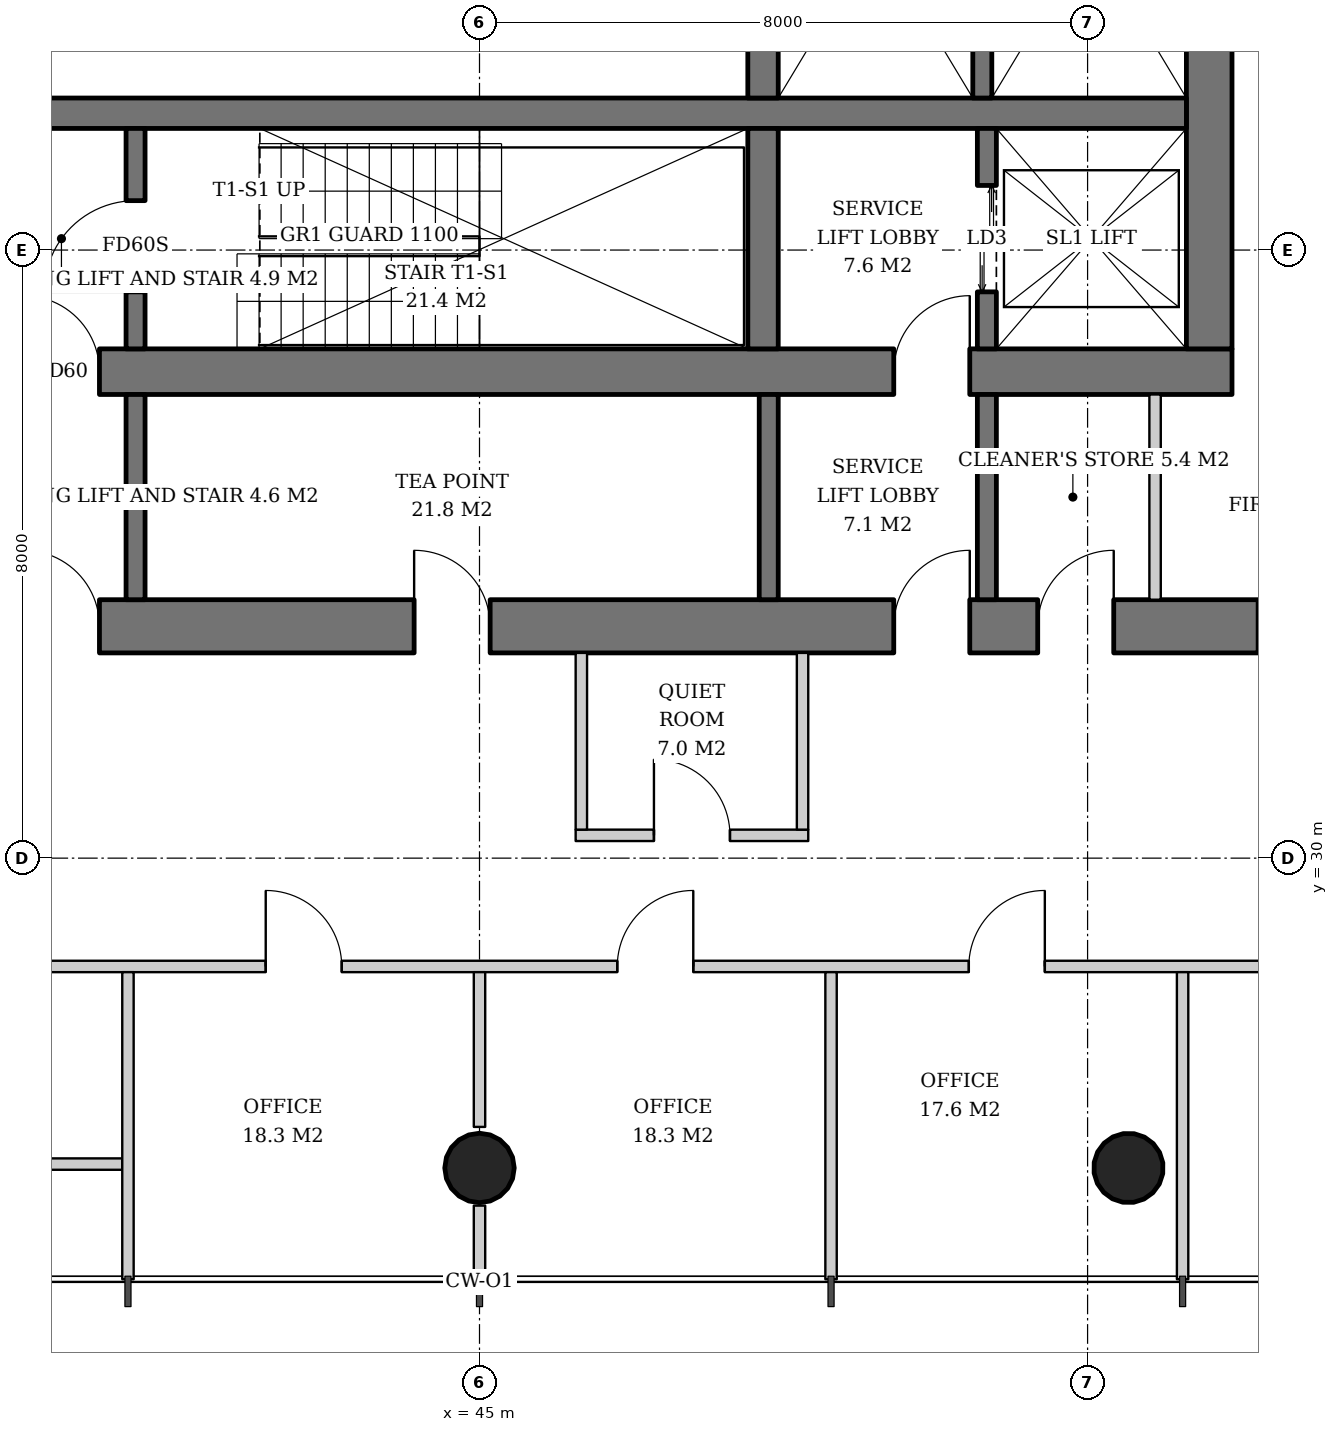
"""IFC4 building model, lengths in metres.
Left out: names, types, materials, properties, quantities, classifications, styles, units other than length and angle.
Written with IfcOpenShell. Run it as: python <this file> out.ifc"""

import sys

from ifc_helpers import new_model, si_unit, direction, frame, frame_2d, origin, origin_2d, place, context, subcontext, project, spatial, rectangle, hollow_circle, extrude, element, fill, save


model = new_model("IFC4")
c1 = context("Model", 3, precision=1e-05, world=origin(), true_north=direction((0.0, 1.0)))
c2 = subcontext(c1, "Body", "Model", "MODEL_VIEW")
j1 = project(units=[si_unit("LENGTHUNIT", "METRE"), si_unit("PLANEANGLEUNIT", "RADIAN")], contexts=[c1])
p1 = place(None, origin())
s1 = spatial("IfcSite", under=j1, at=p1, CompositionType="ELEMENT")
p2 = place(p1, origin())
s2 = spatial("IfcBuilding", under=s1, at=p2, CompositionType="ELEMENT")
p3 = place(p2, frame((0.0, 0.0, 142.6)))
s3 = spatial("IfcBuildingStorey", under=s2, at=p3, CompositionType="ELEMENT", Elevation=142.6)
p4 = place(p3, frame((45.0, 25.886, 0.0), z_axis=(0.0, 0.031916396774, 0.999490542035), x_axis=(-1.0, 0.0, 0.0)))
e1 = element("IfcColumn", 1, at=p4, inside=s3, PredefinedType="COLUMN", context=c2, shape_type="SweptSolid", body=[
    extrude(hollow_circle(Radius=0.457, WallThickness=0.03, at=origin_2d()), origin(), (0.0, 0.0, 1.0), 3.802),
])
p5 = place(p3, frame((53.557, 25.886, 0.0), z_axis=(-0.01598826355, 0.031912317206, 0.999362786699), x_axis=(-0.894067115991, -0.447933021895, 0.0)))
e2 = element("IfcColumn", 2, at=p5, inside=s3, PredefinedType="COLUMN", context=c2, shape_type="SweptSolid", body=[
    extrude(hollow_circle(Radius=0.457, WallThickness=0.03, at=origin_2d()), origin(), (0.0, 0.0, 1.0), 3.802),
])
p6 = place(p3, frame((35.1, 36.4, 0.0), z_axis=(0.0, 0.0, 1.0), x_axis=(1.0, 0.0, 0.0)))
e3 = element("IfcWall", 3, at=p6, inside=s3, PredefinedType="SHEAR", context=c2, shape_type="SweptSolid", body=[
    extrude(rectangle(XDim=19.8, YDim=0.6, at=frame_2d((9.9, 0.0))), origin(), (0.0, 0.0, 1.0), 3.8),
])
p7 = place(p6, frame((3.9, 0.0, 0.0)))
e4 = element("IfcOpeningElement", 4, at=p7, cuts=e3, PredefinedType="OPENING", context=c2, shape_type="SweptSolid", body=[
    extrude(rectangle(XDim=1.0, YDim=2.1, at=frame_2d((0.5, 1.05))), frame((0.0, 0.31, 0.0), z_axis=(0.0, -1.0, 0.0), x_axis=(1.0, 0.0, 0.0)), (0.0, 0.0, 1.0), 0.62),
])
p8 = place(p6, frame((15.35, 0.0, 0.0)))
e5 = element("IfcOpeningElement", 5, at=p8, cuts=e3, PredefinedType="OPENING", context=c2, shape_type="SweptSolid", body=[
    extrude(rectangle(XDim=1.0, YDim=2.1, at=frame_2d((0.5, 1.05))), frame((0.0, 0.31, 0.0), z_axis=(0.0, -1.0, 0.0), x_axis=(1.0, 0.0, 0.0)), (0.0, 0.0, 1.0), 0.62),
])
p9 = place(p3, frame((54.6, 36.7, 0.0), z_axis=(0.0, 0.0, 1.0), x_axis=(0.0, 1.0, 0.0)))
e6 = element("IfcWall", 6, at=p9, inside=s3, PredefinedType="SHEAR", context=c2, shape_type="SweptSolid", body=[
    extrude(rectangle(XDim=18.6, YDim=0.6, at=frame_2d((9.3, 0.0))), origin(), (0.0, 0.0, 1.0), 3.8),
])
p10 = place(p9, frame((8.4, 0.0, 0.0)))
e7 = element("IfcOpeningElement", 7, at=p10, cuts=e6, PredefinedType="OPENING", context=c2, shape_type="SweptSolid", body=[
    extrude(rectangle(XDim=1.8, YDim=2.4, at=frame_2d((0.9, 1.2))), frame((0.0, 0.31, 0.0), z_axis=(0.0, -1.0, 0.0), x_axis=(1.0, 0.0, 0.0)), (0.0, 0.0, 1.0), 0.62),
])
p11 = place(p3, frame((31.7, 33.05, 0.0), z_axis=(0.0, 0.0, 1.0), x_axis=(1.0, 0.0, 0.0)))
e8 = element("IfcWall", 8, at=p11, inside=s3, PredefinedType="SHEAR", context=c2, shape_type="SweptSolid", body=[
    extrude(rectangle(XDim=26.6, YDim=0.7, at=frame_2d((13.3, 0.0))), origin(), (0.0, 0.0, 1.0), 3.8),
])
p12 = place(p11, frame((7.3, 0.0, 0.0)))
e9 = element("IfcOpeningElement", 9, at=p12, cuts=e8, PredefinedType="OPENING", context=c2, shape_type="SweptSolid", body=[
    extrude(rectangle(XDim=1.0, YDim=2.1, at=frame_2d((0.5, 1.05))), frame((0.0, 0.36, 0.0), z_axis=(0.0, -1.0, 0.0), x_axis=(1.0, 0.0, 0.0)), (0.0, 0.0, 1.0), 0.72),
])
p13 = place(p11, frame((18.75, 0.0, 0.0)))
e10 = element("IfcOpeningElement", 10, at=p13, cuts=e8, PredefinedType="OPENING", context=c2, shape_type="SweptSolid", body=[
    extrude(rectangle(XDim=1.0, YDim=2.1, at=frame_2d((0.5, 1.05))), frame((0.0, 0.36, 0.0), z_axis=(0.0, -1.0, 0.0), x_axis=(1.0, 0.0, 0.0)), (0.0, 0.0, 1.0), 0.72),
])
p14 = place(p11, frame((1.85, 0.0, 0.0)))
e11 = element("IfcOpeningElement", 11, at=p14, cuts=e8, PredefinedType="OPENING", context=c2, shape_type="SweptSolid", body=[
    extrude(rectangle(XDim=1.0, YDim=2.1, at=frame_2d((0.5, 1.05))), frame((0.0, 0.36, 0.0), z_axis=(0.0, -1.0, 0.0), x_axis=(1.0, 0.0, 0.0)), (0.0, 0.0, 1.0), 0.72),
])
p15 = place(p11, frame((4.7, 0.0, 0.0)))
e12 = element("IfcOpeningElement", 12, at=p15, cuts=e8, PredefinedType="OPENING", context=c2, shape_type="SweptSolid", body=[
    extrude(rectangle(XDim=1.0, YDim=2.1, at=frame_2d((0.5, 1.05))), frame((0.0, 0.36, 0.0), z_axis=(0.0, -1.0, 0.0), x_axis=(1.0, 0.0, 0.0)), (0.0, 0.0, 1.0), 0.72),
])
p16 = place(p11, frame((12.44, 0.0, 0.0)))
e13 = element("IfcOpeningElement", 13, at=p16, cuts=e8, PredefinedType="OPENING", context=c2, shape_type="SweptSolid", body=[
    extrude(rectangle(XDim=1.0, YDim=2.1, at=frame_2d((0.5, 1.05))), frame((0.0, 0.36, 0.0), z_axis=(0.0, -1.0, 0.0), x_axis=(1.0, 0.0, 0.0)), (0.0, 0.0, 1.0), 0.72),
])
p17 = place(p11, frame((20.644, 0.0, 0.0)))
e14 = element("IfcOpeningElement", 14, at=p17, cuts=e8, PredefinedType="OPENING", context=c2, shape_type="SweptSolid", body=[
    extrude(rectangle(XDim=1.0, YDim=2.1, at=frame_2d((0.5, 1.05))), frame((0.0, 0.36, 0.0), z_axis=(0.0, -1.0, 0.0), x_axis=(1.0, 0.0, 0.0)), (0.0, 0.0, 1.0), 0.72),
])
p18 = place(p11, frame((23.544, 0.0, 0.0)))
e15 = element("IfcOpeningElement", 15, at=p18, cuts=e8, PredefinedType="OPENING", context=c2, shape_type="SweptSolid", body=[
    extrude(rectangle(XDim=1.0, YDim=2.1, at=frame_2d((0.5, 1.05))), frame((0.0, 0.36, 0.0), z_axis=(0.0, -1.0, 0.0), x_axis=(1.0, 0.0, 0.0)), (0.0, 0.0, 1.0), 0.72),
])
p19 = place(p3, frame((35.7, 39.8, 0.0), z_axis=(0.0, 0.0, 1.0), x_axis=(1.0, 0.0, 0.0)))
e16 = element("IfcWall", 16, at=p19, inside=s3, PredefinedType="SHEAR", context=c2, shape_type="SweptSolid", body=[
    extrude(rectangle(XDim=18.6, YDim=0.4, at=frame_2d((9.3, 0.0))), origin(), (0.0, 0.0, 1.0), 3.8),
])
p20 = place(p3, frame((48.73, 36.7, 0.0), z_axis=(0.0, 0.0, 1.0), x_axis=(0.0, 1.0, 0.0)))
e17 = element("IfcWall", 17, at=p20, inside=s3, PredefinedType="SHEAR", context=c2, shape_type="SweptSolid", body=[
    extrude(rectangle(XDim=2.9, YDim=0.4, at=frame_2d((1.45, 0.0))), origin(), (0.0, 0.0, 1.0), 3.8),
])
p21 = place(p3, frame((48.73, 40.0, 0.0), z_axis=(0.0, 0.0, 1.0), x_axis=(0.0, 1.0, 0.0)))
e18 = element("IfcWall", 18, at=p21, inside=s3, PredefinedType="SHEAR", context=c2, shape_type="SweptSolid", body=[
    extrude(rectangle(XDim=12.0, YDim=0.4, at=frame_2d((6.0, 0.0))), origin(), (0.0, 0.0, 1.0), 3.8),
])
p22 = place(p3, frame((40.475, 36.7, 0.0), z_axis=(0.0, 0.0, 1.0), x_axis=(0.0, 1.0, 0.0)))
e19 = element("IfcWall", 19, at=p22, inside=s3, PredefinedType="SHEAR", context=c2, shape_type="SweptSolid", body=[
    extrude(rectangle(XDim=2.9, YDim=0.25, at=frame_2d((1.45, 0.0))), origin(), (0.0, 0.0, 1.0), 3.8),
])
p23 = place(p22, frame((0.75, 0.0, 0.0)))
e20 = element("IfcOpeningElement", 20, at=p23, cuts=e19, PredefinedType="OPENING", context=c2, shape_type="SweptSolid", body=[
    extrude(rectangle(XDim=1.2, YDim=2.1, at=frame_2d((0.6, 1.05))), frame((0.0, 0.135, 0.0), z_axis=(0.0, -1.0, 0.0), x_axis=(1.0, 0.0, 0.0)), (0.0, 0.0, 1.0), 0.27),
])
p24 = place(p3, frame((51.675, 36.7, 0.0), z_axis=(0.0, 0.0, 1.0), x_axis=(0.0, 1.0, 0.0)))
e21 = element("IfcWall", 21, at=p24, inside=s3, PredefinedType="SHEAR", context=c2, shape_type="SweptSolid", body=[
    extrude(rectangle(XDim=2.9, YDim=0.25, at=frame_2d((1.45, 0.0))), origin(), (0.0, 0.0, 1.0), 3.8),
])
p25 = place(p24, frame((0.75, 0.0, 0.0)))
e22 = element("IfcOpeningElement", 22, at=p25, cuts=e21, PredefinedType="OPENING", context=c2, shape_type="SweptSolid", body=[
    extrude(rectangle(XDim=1.4, YDim=2.4, at=frame_2d((0.7, 1.2))), frame((0.0, 0.135, 0.0), z_axis=(0.0, -1.0, 0.0), x_axis=(1.0, 0.0, 0.0)), (0.0, 0.0, 1.0), 0.27),
])
p26 = place(p3, frame((51.615, 44.25, 0.0), z_axis=(0.0, 0.0, 1.0), x_axis=(0.0, -1.0, 0.0)))
e23 = element("IfcWall", 23, at=p26, inside=s3, PredefinedType="SHEAR", context=c2, shape_type="SweptSolid", body=[
    extrude(rectangle(XDim=4.25, YDim=0.25, at=frame_2d((2.125, 0.0))), origin(), (0.0, 0.0, 1.0), 3.8),
])
for number, where, z_axis, x_axis in (
    (24, (40.475, 33.4, 0.0), (0.0, 0.0, 1.0), (0.0, 1.0, 0.0)),
    (25, (48.805, 33.4, 0.0), (0.0, 0.0, 1.0), (0.0, 1.0, 0.0)),
    (26, (51.675, 33.4, 0.0), (0.0, 0.0, 1.0), (0.0, 1.0, 0.0)),
):
    element("IfcWall", number, at=place(p3, frame(where, z_axis=z_axis, x_axis=x_axis)), inside=s3, PredefinedType="SOLIDWALL", context=c2, shape_type="SweptSolid", body=[
        extrude(rectangle(XDim=2.7, YDim=0.25, at=frame_2d((1.35, 0.0))), origin(), (0.0, 0.0, 1.0), 3.62),
    ])
p27 = place(p3, frame((53.888, 33.4, 0.0), z_axis=(0.0, 0.0, 1.0), x_axis=(0.0, 1.0, 0.0)))
e27 = element("IfcWall", 27, at=p27, inside=s3, PredefinedType="SOLIDWALL", context=c2, shape_type="SweptSolid", body=[
    extrude(rectangle(XDim=2.7, YDim=0.15, at=frame_2d((1.35, 0.0))), origin(), (0.0, 0.0, 1.0), 3.62),
])
p28 = place(p3, frame((46.265, 30.3, 0.0), z_axis=(0.0, 0.0, 1.0), x_axis=(1.0, 0.0, 0.0)))
e28 = element("IfcWall", 28, at=p28, inside=s3, PredefinedType="PARTITIONING", context=c2, shape_type="SweptSolid", body=[
    extrude(rectangle(XDim=3.06, YDim=0.15, at=frame_2d((1.53, 0.0))), origin(), (0.0, 0.0, 1.0), 2.858),
])
p29 = place(p28, frame((1.03, 0.0, 0.0)))
e29 = element("IfcOpeningElement", 29, at=p29, cuts=e28, PredefinedType="OPENING", context=c2, shape_type="SweptSolid", body=[
    extrude(rectangle(XDim=1.0, YDim=2.1, at=frame_2d((0.5, 1.05))), frame((0.0, 0.085, 0.0), z_axis=(0.0, -1.0, 0.0), x_axis=(1.0, 0.0, 0.0)), (0.0, 0.0, 1.0), 0.17),
])
for number, where, z_axis, x_axis in (
    (30, (46.34, 32.7, 0.0), (0.0, 0.0, 1.0), (0.0, -1.0, 0.0)),
    (31, (49.25, 32.7, 0.0), (0.0, 0.0, 1.0), (0.0, -1.0, 0.0)),
):
    element("IfcWall", number, at=place(p3, frame(where, z_axis=z_axis, x_axis=x_axis)), inside=s3, PredefinedType="PARTITIONING", context=c2, shape_type="SweptSolid", body=[
        extrude(rectangle(XDim=2.325, YDim=0.15, at=frame_2d((1.163, 0.0))), origin(), (0.0, 0.0, 1.0), 3.62),
    ])
p30 = place(p3, frame((36.96, 25.975, 0.0), z_axis=(0.0, 0.0, 1.0), x_axis=(1.0, 0.0, 0.0)))
e32 = element("IfcWall", 32, at=p30, inside=s3, PredefinedType="PARTITIONING", context=c2, shape_type="SweptSolid", body=[
    extrude(rectangle(XDim=3.34, YDim=0.15, at=frame_2d((1.67, 0.0))), origin(), (0.0, 0.0, 1.0), 2.82),
])
p31 = place(p3, frame((29.489, 28.575, 0.0), z_axis=(0.0, 0.0, 1.0), x_axis=(1.0, 0.0, 0.0)))
e33 = element("IfcWall", 33, at=p31, inside=s3, PredefinedType="PARTITIONING", context=c2, shape_type="SweptSolid", body=[
    extrude(rectangle(XDim=31.023, YDim=0.15, at=frame_2d((15.511, 0.0))), origin(), (0.0, 0.0, 1.0), 2.72),
])
p32 = place(p31, frame((3.449, 0.0, 0.0)))
e34 = element("IfcOpeningElement", 34, at=p32, cuts=e33, PredefinedType="OPENING", context=c2, shape_type="SweptSolid", body=[
    extrude(rectangle(XDim=1.0, YDim=2.1, at=frame_2d((0.5, 1.05))), frame((0.0, 0.085, 0.0), z_axis=(0.0, -1.0, 0.0), x_axis=(1.0, 0.0, 0.0)), (0.0, 0.0, 1.0), 0.17),
])
p33 = place(p31, frame((8.074, 0.0, 0.0)))
e35 = element("IfcOpeningElement", 35, at=p33, cuts=e33, PredefinedType="OPENING", context=c2, shape_type="SweptSolid", body=[
    extrude(rectangle(XDim=1.0, YDim=2.1, at=frame_2d((0.5, 1.05))), frame((0.0, 0.085, 0.0), z_axis=(0.0, -1.0, 0.0), x_axis=(1.0, 0.0, 0.0)), (0.0, 0.0, 1.0), 0.17),
])
p34 = place(p31, frame((12.699, 0.0, 0.0)))
e36 = element("IfcOpeningElement", 36, at=p34, cuts=e33, PredefinedType="OPENING", context=c2, shape_type="SweptSolid", body=[
    extrude(rectangle(XDim=1.0, YDim=2.1, at=frame_2d((0.5, 1.05))), frame((0.0, 0.085, 0.0), z_axis=(0.0, -1.0, 0.0), x_axis=(1.0, 0.0, 0.0)), (0.0, 0.0, 1.0), 0.17),
])
p35 = place(p31, frame((17.324, 0.0, 0.0)))
e37 = element("IfcOpeningElement", 37, at=p35, cuts=e33, PredefinedType="OPENING", context=c2, shape_type="SweptSolid", body=[
    extrude(rectangle(XDim=1.0, YDim=2.1, at=frame_2d((0.5, 1.05))), frame((0.0, 0.085, 0.0), z_axis=(0.0, -1.0, 0.0), x_axis=(1.0, 0.0, 0.0)), (0.0, 0.0, 1.0), 0.17),
])
p36 = place(p31, frame((21.949, 0.0, 0.0)))
e38 = element("IfcOpeningElement", 38, at=p36, cuts=e33, PredefinedType="OPENING", context=c2, shape_type="SweptSolid", body=[
    extrude(rectangle(XDim=1.0, YDim=2.1, at=frame_2d((0.5, 1.05))), frame((0.0, 0.085, 0.0), z_axis=(0.0, -1.0, 0.0), x_axis=(1.0, 0.0, 0.0)), (0.0, 0.0, 1.0), 0.17),
])
p37 = place(p31, frame((26.574, 0.0, 0.0)))
e39 = element("IfcOpeningElement", 39, at=p37, cuts=e33, PredefinedType="OPENING", context=c2, shape_type="SweptSolid", body=[
    extrude(rectangle(XDim=1.0, YDim=2.1, at=frame_2d((0.5, 1.05))), frame((0.0, 0.085, 0.0), z_axis=(0.0, -1.0, 0.0), x_axis=(1.0, 0.0, 0.0)), (0.0, 0.0, 1.0), 0.17),
])
p38 = place(p3, frame((40.375, 28.5, 0.0), z_axis=(0.0, 0.0, 1.0), x_axis=(0.0, -1.0, 0.0)))
e40 = element("IfcWall", 40, at=p38, inside=s3, PredefinedType="PARTITIONING", context=c2, shape_type="SweptSolid", body=[
    extrude(rectangle(XDim=4.04, YDim=0.15, at=frame_2d((2.02, 0.0))), origin(), (0.0, 0.0, 1.0), 2.82),
])
p39 = place(p3, frame((45.0, 28.5, 0.0), z_axis=(0.0, 0.0, 1.0), x_axis=(0.0, -1.0, 0.0)))
e41 = element("IfcWall", 41, at=p39, inside=s3, PredefinedType="PARTITIONING", context=c2, shape_type="SweptSolid", body=[
    extrude(rectangle(XDim=2.036, YDim=0.15, at=frame_2d((1.018, 0.0))), origin(), (0.0, 0.0, 1.0), 3.62),
])
p40 = place(p3, frame((45.0, 25.429, 0.0), z_axis=(0.0, 0.0, 1.0), x_axis=(0.0, -1.0, 0.0)))
e42 = element("IfcWall", 42, at=p40, inside=s3, PredefinedType="PARTITIONING", context=c2, shape_type="SweptSolid", body=[
    extrude(rectangle(XDim=0.969, YDim=0.15, at=frame_2d((0.484, 0.0))), origin(), (0.0, 0.0, 1.0), 3.62),
])
for number, where, z_axis, x_axis in (
    (43, (49.625, 28.5, 0.0), (0.0, 0.0, 1.0), (0.0, -1.0, 0.0)),
    (44, (54.25, 28.5, 0.0), (0.0, 0.0, 1.0), (0.0, -1.0, 0.0)),
):
    element("IfcWall", number, at=place(p3, frame(where, z_axis=z_axis, x_axis=x_axis)), inside=s3, PredefinedType="PARTITIONING", context=c2, shape_type="SweptSolid", body=[
        extrude(rectangle(XDim=4.04, YDim=0.15, at=frame_2d((2.02, 0.0))), origin(), (0.0, 0.0, 1.0), 2.82),
    ])
p41 = place(p23, origin())
e45 = element("IfcDoor", 45, at=p41, inside=s3, OperationType="SINGLE_SWING_LEFT", PredefinedType="DOOR", context=c2, shape_type="SweptSolid", body=[
    extrude(rectangle(XDim=1.2, YDim=2.1, at=frame_2d((0.6, 1.05))), frame((0.0, 0.025, 0.0), z_axis=(0.0, -1.0, 0.0), x_axis=(1.0, 0.0, 0.0)), (0.0, 0.0, 1.0), 0.05),
])
fill(e20, e45)
p42 = place(p25, origin())
e46 = element("IfcDoor", 46, at=p42, inside=s3, OperationType="DOUBLE_DOOR_SLIDING", PredefinedType="DOOR", context=c2, shape_type="SweptSolid", body=[
    extrude(rectangle(XDim=1.4, YDim=2.4, at=frame_2d((0.7, 1.2))), frame((0.0, 0.025, 0.0), z_axis=(0.0, -1.0, 0.0), x_axis=(1.0, 0.0, 0.0)), (0.0, 0.0, 1.0), 0.05),
])
fill(e22, e46)
p43 = place(p7, origin())
e47 = element("IfcDoor", 47, at=p43, inside=s3, OperationType="SINGLE_SWING_LEFT", PredefinedType="DOOR", context=c2, shape_type="SweptSolid", body=[
    extrude(rectangle(XDim=1.0, YDim=2.1, at=frame_2d((0.5, 1.05))), frame((0.0, 0.025, 0.0), z_axis=(0.0, -1.0, 0.0), x_axis=(1.0, 0.0, 0.0)), (0.0, 0.0, 1.0), 0.05),
])
fill(e4, e47)
p44 = place(p8, origin())
e48 = element("IfcDoor", 48, at=p44, inside=s3, OperationType="SINGLE_SWING_RIGHT", PredefinedType="DOOR", context=c2, shape_type="SweptSolid", body=[
    extrude(rectangle(XDim=1.0, YDim=2.1, at=frame_2d((0.5, 1.05))), frame((0.0, 0.025, 0.0), z_axis=(0.0, -1.0, 0.0), x_axis=(1.0, 0.0, 0.0)), (0.0, 0.0, 1.0), 0.05),
])
fill(e5, e48)
p45 = place(p12, origin())
e49 = element("IfcDoor", 49, at=p45, inside=s3, OperationType="SINGLE_SWING_LEFT", PredefinedType="DOOR", context=c2, shape_type="SweptSolid", body=[
    extrude(rectangle(XDim=1.0, YDim=2.1, at=frame_2d((0.5, 1.05))), frame((0.0, 0.025, 0.0), z_axis=(0.0, -1.0, 0.0), x_axis=(1.0, 0.0, 0.0)), (0.0, 0.0, 1.0), 0.05),
])
fill(e9, e49)
p46 = place(p13, origin())
e50 = element("IfcDoor", 50, at=p46, inside=s3, OperationType="SINGLE_SWING_RIGHT", PredefinedType="DOOR", context=c2, shape_type="SweptSolid", body=[
    extrude(rectangle(XDim=1.0, YDim=2.1, at=frame_2d((0.5, 1.05))), frame((0.0, 0.025, 0.0), z_axis=(0.0, -1.0, 0.0), x_axis=(1.0, 0.0, 0.0)), (0.0, 0.0, 1.0), 0.05),
])
fill(e10, e50)
p47 = place(p16, origin())
e51 = element("IfcDoor", 51, at=p47, inside=s3, OperationType="SINGLE_SWING_LEFT", PredefinedType="DOOR", context=c2, shape_type="SweptSolid", body=[
    extrude(rectangle(XDim=1.0, YDim=2.1, at=frame_2d((0.5, 1.05))), frame((0.0, 0.34, 0.0), z_axis=(0.0, -1.0, 0.0), x_axis=(1.0, 0.0, 0.0)), (0.0, 0.0, 1.0), 0.05),
])
fill(e13, e51)
p48 = place(p17, origin())
e52 = element("IfcDoor", 52, at=p48, inside=s3, OperationType="SINGLE_SWING_RIGHT", PredefinedType="DOOR", context=c2, shape_type="SweptSolid", body=[
    extrude(rectangle(XDim=1.0, YDim=2.1, at=frame_2d((0.5, 1.05))), frame((0.0, 0.34, 0.0), z_axis=(0.0, -1.0, 0.0), x_axis=(1.0, 0.0, 0.0)), (0.0, 0.0, 1.0), 0.05),
])
fill(e14, e52)
p49 = place(p18, origin())
e53 = element("IfcDoor", 53, at=p49, inside=s3, OperationType="SINGLE_SWING_RIGHT", PredefinedType="DOOR", context=c2, shape_type="SweptSolid", body=[
    extrude(rectangle(XDim=1.0, YDim=2.1, at=frame_2d((0.5, 1.05))), frame((0.0, 0.34, 0.0), z_axis=(0.0, -1.0, 0.0), x_axis=(1.0, 0.0, 0.0)), (0.0, 0.0, 1.0), 0.05),
])
fill(e15, e53)
p50 = place(p29, origin())
e54 = element("IfcDoor", 54, at=p50, inside=s3, OperationType="SINGLE_SWING_LEFT", PredefinedType="DOOR", context=c2, shape_type="SweptSolid", body=[
    extrude(rectangle(XDim=1.0, YDim=2.1, at=frame_2d((0.5, 1.05))), frame((0.0, 0.025, 0.0), z_axis=(0.0, -1.0, 0.0), x_axis=(1.0, 0.0, 0.0)), (0.0, 0.0, 1.0), 0.05),
])
fill(e29, e54)
p51 = place(p34, origin())
e55 = element("IfcDoor", 55, at=p51, inside=s3, OperationType="SINGLE_SWING_LEFT", PredefinedType="DOOR", context=c2, shape_type="SweptSolid", body=[
    extrude(rectangle(XDim=1.0, YDim=2.1, at=frame_2d((0.5, 1.05))), frame((0.0, 0.025, 0.0), z_axis=(0.0, -1.0, 0.0), x_axis=(1.0, 0.0, 0.0)), (0.0, 0.0, 1.0), 0.05),
])
fill(e36, e55)
p52 = place(p35, origin())
e56 = element("IfcDoor", 56, at=p52, inside=s3, OperationType="SINGLE_SWING_RIGHT", PredefinedType="DOOR", context=c2, shape_type="SweptSolid", body=[
    extrude(rectangle(XDim=1.0, YDim=2.1, at=frame_2d((0.5, 1.05))), frame((0.0, 0.025, 0.0), z_axis=(0.0, -1.0, 0.0), x_axis=(1.0, 0.0, 0.0)), (0.0, 0.0, 1.0), 0.05),
])
fill(e37, e56)
p53 = place(p36, origin())
e57 = element("IfcDoor", 57, at=p53, inside=s3, OperationType="SINGLE_SWING_RIGHT", PredefinedType="DOOR", context=c2, shape_type="SweptSolid", body=[
    extrude(rectangle(XDim=1.0, YDim=2.1, at=frame_2d((0.5, 1.05))), frame((0.0, 0.025, 0.0), z_axis=(0.0, -1.0, 0.0), x_axis=(1.0, 0.0, 0.0)), (0.0, 0.0, 1.0), 0.05),
])
fill(e38, e57)
save(model, sys.argv[1])
